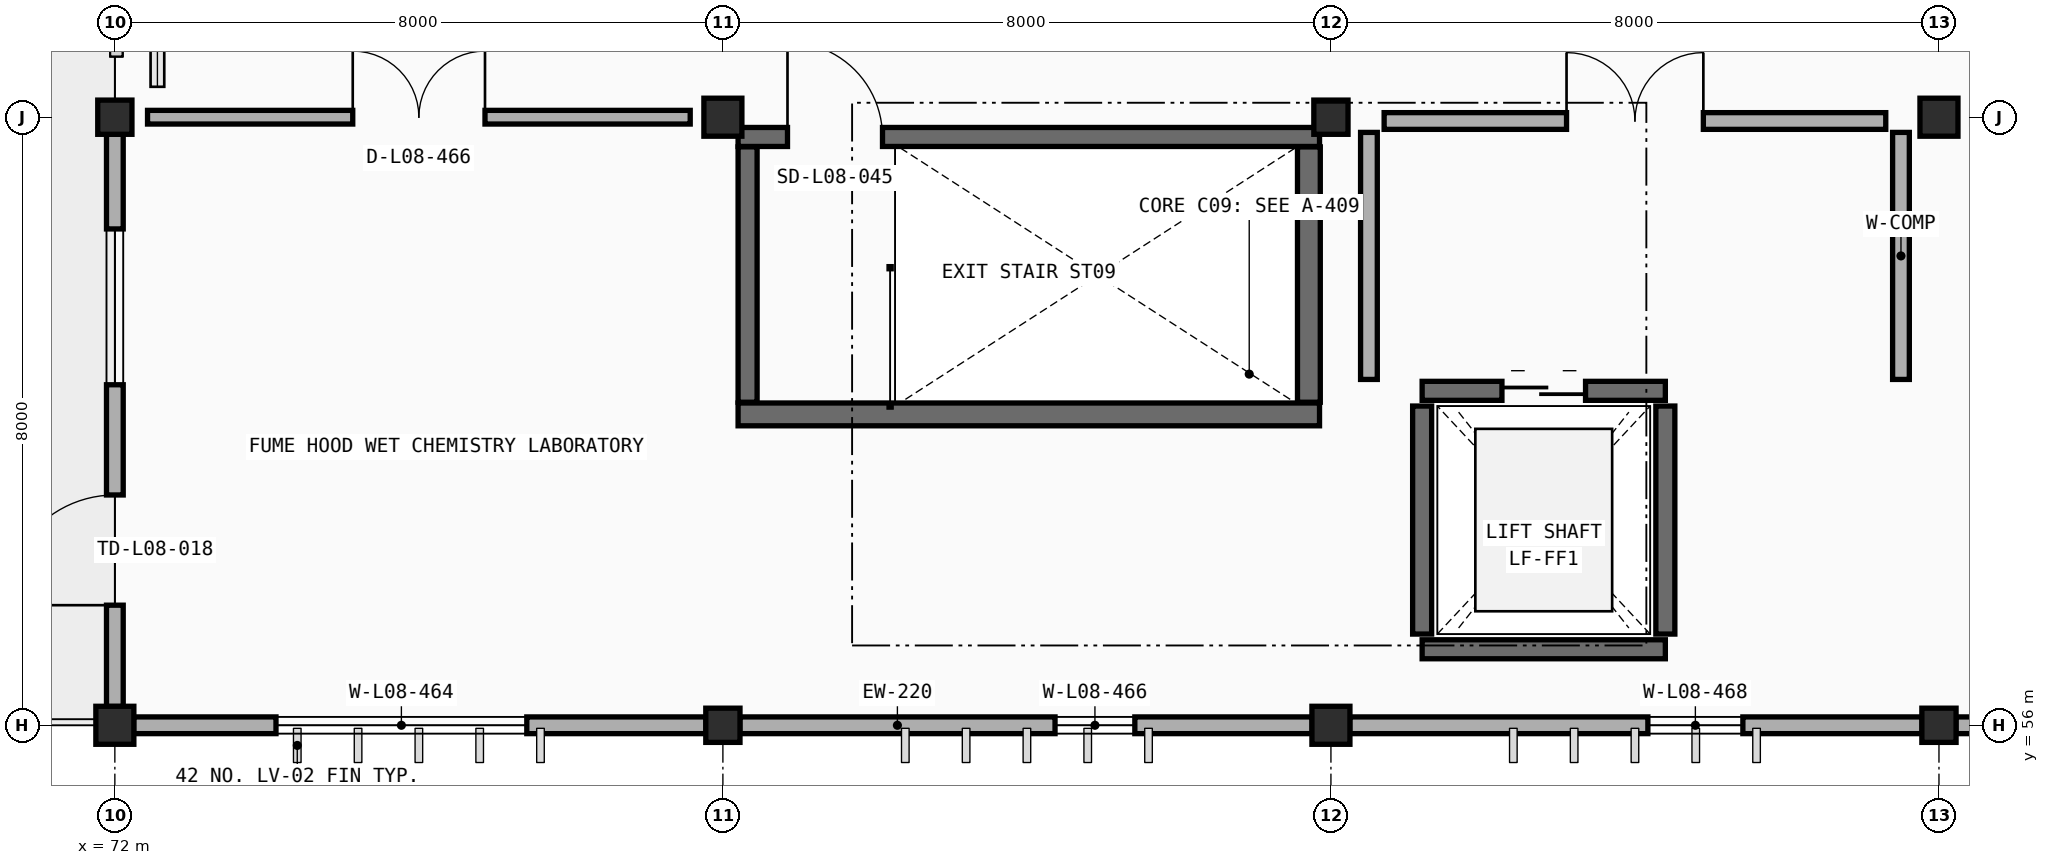
"""IFC4 building model, lengths in metres.
Left out: names, types, materials, properties, quantities, classifications, styles, units other than length and angle.
Written with IfcOpenShell. Run it as: python <this file> out.ifc"""

import sys

from ifc_helpers import new_model, si_unit, direction, frame, frame_2d, origin, origin_2d, place, context, subcontext, project, spatial, rectangle, extrude, element, fill, save


model = new_model("IFC4")
c1 = context("Model", 3, precision=1e-05, world=origin(), true_north=direction((0.0, 1.0)))
c2 = subcontext(c1, "Body", "Model", "MODEL_VIEW")
j1 = project(units=[si_unit("LENGTHUNIT", "METRE"), si_unit("PLANEANGLEUNIT", "RADIAN")], contexts=[c1])
p1 = place(None, origin())
s1 = spatial("IfcSite", under=j1, at=p1, CompositionType="ELEMENT")
p2 = place(p1, origin())
s2 = spatial("IfcBuilding", under=s1, at=p2, CompositionType="ELEMENT")
p3 = place(p2, frame((0.0, 0.0, 30.6)))
s3 = spatial("IfcBuildingStorey", under=s2, at=p3, CompositionType="ELEMENT", Elevation=30.6)
p4 = place(p3, frame((72.0, 56.0, 0.0), z_axis=(0.0, 0.0, 1.0), x_axis=(1.0, 0.0, 0.0)))
e1 = element("IfcColumn", 1, at=p4, inside=s3, PredefinedType="COLUMN", context=c2, shape_type="SweptSolid", body=[
    extrude(rectangle(XDim=0.5, YDim=0.5, at=origin_2d()), origin(), (0.0, 0.0, 1.0), 4.2),
])
p5 = place(p3, frame((80.0, 56.0, 0.0), z_axis=(0.0, 0.0, 1.0), x_axis=(1.0, 0.0, 0.0)))
e2 = element("IfcColumn", 2, at=p5, inside=s3, PredefinedType="COLUMN", context=c2, shape_type="SweptSolid", body=[
    extrude(rectangle(XDim=0.45, YDim=0.45, at=origin_2d()), origin(), (0.0, 0.0, 1.0), 4.2),
])
p6 = place(p3, frame((88.0, 56.0, 0.0), z_axis=(0.0, 0.0, 1.0), x_axis=(1.0, 0.0, 0.0)))
e3 = element("IfcColumn", 3, at=p6, inside=s3, PredefinedType="COLUMN", context=c2, shape_type="SweptSolid", body=[
    extrude(rectangle(XDim=0.5, YDim=0.5, at=origin_2d()), origin(), (0.0, 0.0, 1.0), 4.2),
])
for number, where, z_axis, x_axis in (
    (4, (96.0, 56.0, 0.0), (0.0, 0.0, 1.0), (1.0, 0.0, 0.0)),
    (5, (72.0, 64.0, 0.0), (0.0, 0.0, 1.0), (1.0, 0.0, 0.0)),
):
    element("IfcColumn", number, at=place(p3, frame(where, z_axis=z_axis, x_axis=x_axis)), inside=s3, PredefinedType="COLUMN", context=c2, shape_type="SweptSolid", body=[
        extrude(rectangle(XDim=0.45, YDim=0.45, at=origin_2d()), origin(), (0.0, 0.0, 1.0), 4.2),
    ])
p7 = place(p3, frame((80.0, 64.0, 0.0), z_axis=(0.0, 0.0, 1.0), x_axis=(1.0, 0.0, 0.0)))
e6 = element("IfcColumn", 6, at=p7, inside=s3, PredefinedType="COLUMN", context=c2, shape_type="SweptSolid", body=[
    extrude(rectangle(XDim=0.5, YDim=0.5, at=origin_2d()), origin(), (0.0, 0.0, 1.0), 4.2),
])
p8 = place(p3, frame((88.0, 64.0, 0.0), z_axis=(0.0, 0.0, 1.0), x_axis=(1.0, 0.0, 0.0)))
e7 = element("IfcColumn", 7, at=p8, inside=s3, PredefinedType="COLUMN", context=c2, shape_type="SweptSolid", body=[
    extrude(rectangle(XDim=0.45, YDim=0.45, at=origin_2d()), origin(), (0.0, 0.0, 1.0), 4.2),
])
p9 = place(p3, frame((96.0, 64.0, 0.0), z_axis=(0.0, 0.0, 1.0), x_axis=(1.0, 0.0, 0.0)))
e8 = element("IfcColumn", 8, at=p9, inside=s3, PredefinedType="COLUMN", context=c2, shape_type="SweptSolid", body=[
    extrude(rectangle(XDim=0.5, YDim=0.5, at=origin_2d()), origin(), (0.0, 0.0, 1.0), 4.2),
])
p10 = place(p3, frame((79.778, 56.0, 0.0), z_axis=(0.0, 0.0, 1.0), x_axis=(-1.0, 0.0, 0.0)))
e9 = element("IfcWall", 9, at=p10, inside=s3, PredefinedType="STANDARD", context=c2, shape_type="SweptSolid", body=[
    extrude(rectangle(XDim=7.531, YDim=0.22, at=frame_2d((3.766, 0.0))), origin(), (0.0, 0.0, 1.0), 3.335),
])
p11 = place(p10, frame((2.358, 0.0, 0.9)))
e10 = element("IfcOpeningElement", 10, at=p11, cuts=e9, PredefinedType="OPENING", context=c2, shape_type="SweptSolid", body=[
    extrude(rectangle(XDim=3.3, YDim=1.75, at=frame_2d((1.65, 0.875))), frame((0.0, 0.12, 0.0), z_axis=(0.0, -1.0, 0.0), x_axis=(1.0, 0.0, 0.0)), (0.0, 0.0, 1.0), 0.24),
])
p12 = place(p3, frame((87.753, 56.0, 0.0), z_axis=(0.0, 0.0, 1.0), x_axis=(-1.0, 0.0, 0.0)))
e11 = element("IfcWall", 11, at=p12, inside=s3, PredefinedType="STANDARD", context=c2, shape_type="SweptSolid", body=[
    extrude(rectangle(XDim=7.531, YDim=0.22, at=frame_2d((3.766, 0.0))), origin(), (0.0, 0.0, 1.0), 3.335),
])
p13 = place(p12, frame((2.333, 0.0, 0.9)))
e12 = element("IfcOpeningElement", 12, at=p13, cuts=e11, PredefinedType="OPENING", context=c2, shape_type="SweptSolid", body=[
    extrude(rectangle(XDim=1.05, YDim=1.25, at=frame_2d((0.525, 0.625))), frame((0.0, 0.12, 0.0), z_axis=(0.0, -1.0, 0.0), x_axis=(1.0, 0.0, 0.0)), (0.0, 0.0, 1.0), 0.24),
])
p14 = place(p3, frame((95.778, 56.0, 0.0), z_axis=(0.0, 0.0, 1.0), x_axis=(-1.0, 0.0, 0.0)))
e13 = element("IfcWall", 13, at=p14, inside=s3, PredefinedType="STANDARD", context=c2, shape_type="SweptSolid", body=[
    extrude(rectangle(XDim=7.531, YDim=0.22, at=frame_2d((3.766, 0.0))), origin(), (0.0, 0.0, 1.0), 3.335),
])
p15 = place(p14, frame((2.358, 0.0, 0.9)))
e14 = element("IfcOpeningElement", 14, at=p15, cuts=e13, PredefinedType="OPENING", context=c2, shape_type="SweptSolid", body=[
    extrude(rectangle(XDim=1.25, YDim=1.25, at=frame_2d((0.625, 0.625))), frame((0.0, 0.12, 0.0), z_axis=(0.0, -1.0, 0.0), x_axis=(1.0, 0.0, 0.0)), (0.0, 0.0, 1.0), 0.24),
])
p16 = place(p3, frame((103.753, 56.0, 0.0), z_axis=(0.0, 0.0, 1.0), x_axis=(-1.0, 0.0, 0.0)))
e15 = element("IfcWall", 15, at=p16, inside=s3, PredefinedType="STANDARD", context=c2, shape_type="SweptSolid", body=[
    extrude(rectangle(XDim=7.531, YDim=0.22, at=frame_2d((3.766, 0.0))), origin(), (0.0, 0.0, 1.0), 3.335),
])
p17 = place(p16, frame((2.333, 0.0, 0.9)))
e16 = element("IfcOpeningElement", 16, at=p17, cuts=e15, PredefinedType="OPENING", context=c2, shape_type="SweptSolid", body=[
    extrude(rectangle(XDim=3.3, YDim=1.75, at=frame_2d((1.65, 0.875))), frame((0.0, 0.12, 0.0), z_axis=(0.0, -1.0, 0.0), x_axis=(1.0, 0.0, 0.0)), (0.0, 0.0, 1.0), 0.24),
])
p18 = place(p3, frame((72.0, 56.247, 0.0), z_axis=(0.0, 0.0, 1.0), x_axis=(0.0, 1.0, 0.0)))
e17 = element("IfcWall", 17, at=p18, inside=s3, PredefinedType="STANDARD", context=c2, shape_type="SweptSolid", body=[
    extrude(rectangle(XDim=7.531, YDim=0.22, at=frame_2d((3.766, 0.0))), origin(), (0.0, 0.0, 1.0), 3.335),
])
p19 = place(p18, frame((1.333, 0.0, 0.0)))
e18 = element("IfcOpeningElement", 18, at=p19, cuts=e17, PredefinedType="OPENING", context=c2, shape_type="SweptSolid", body=[
    extrude(rectangle(XDim=1.45, YDim=2.25, at=frame_2d((0.725, 1.125))), frame((0.0, 0.12, 0.0), z_axis=(0.0, -1.0, 0.0), x_axis=(1.0, 0.0, 0.0)), (0.0, 0.0, 1.0), 0.24),
])
p20 = place(p18, frame((4.233, 0.0, 0.9)))
e19 = element("IfcOpeningElement", 19, at=p20, cuts=e17, PredefinedType="OPENING", context=c2, shape_type="SweptSolid", body=[
    extrude(rectangle(XDim=2.05, YDim=1.4, at=frame_2d((1.025, 0.7))), frame((0.0, 0.12, 0.0), z_axis=(0.0, -1.0, 0.0), x_axis=(1.0, 0.0, 0.0)), (0.0, 0.0, 1.0), 0.24),
])
p21 = place(p3, frame((72.24, 64.22, 0.0), z_axis=(0.0, 0.0, 1.0), x_axis=(1.0, 0.0, 0.0)))
e20 = element("IfcWall", 20, at=p21, inside=s3, PredefinedType="PARAPET", context=c2, shape_type="SweptSolid", body=[
    extrude(rectangle(XDim=0.32, YDim=0.2, at=frame_2d((0.16, 0.0))), origin(), (0.0, 0.0, 1.0), 3.35),
])
p22 = place(p3, frame((80.2, 60.09, 0.0), z_axis=(0.0, 0.0, 1.0), x_axis=(1.0, 0.0, 0.0)))
e21 = element("IfcWall", 21, at=p22, inside=s3, PredefinedType="SHEAR", context=c2, shape_type="SweptSolid", body=[
    extrude(rectangle(XDim=7.65, YDim=0.3, at=frame_2d((3.825, 0.0))), origin(), (0.0, 0.0, 1.0), 4.2),
])
p23 = place(p3, frame((87.71, 60.25, 0.0), z_axis=(0.0, 0.0, 1.0), x_axis=(0.0, 1.0, 0.0)))
e22 = element("IfcWall", 22, at=p23, inside=s3, PredefinedType="SHEAR", context=c2, shape_type="SweptSolid", body=[
    extrude(rectangle(XDim=3.36, YDim=0.3, at=frame_2d((1.68, 0.0))), origin(), (0.0, 0.0, 1.0), 4.2),
])
p24 = place(p3, frame((80.2, 63.74, 0.0), z_axis=(0.0, 0.0, 1.0), x_axis=(1.0, 0.0, 0.0)))
e23 = element("IfcWall", 23, at=p24, inside=s3, PredefinedType="SOLIDWALL", context=c2, shape_type="SweptSolid", body=[
    extrude(rectangle(XDim=7.65, YDim=0.25, at=frame_2d((3.825, 0.0))), origin(), (0.0, 0.0, 1.0), 4.2),
])
p25 = place(p24, frame((0.65, 0.0, 0.0)))
e24 = element("IfcOpeningElement", 24, at=p25, cuts=e23, PredefinedType="OPENING", context=c2, shape_type="SweptSolid", body=[
    extrude(rectangle(XDim=1.25, YDim=2.15, at=frame_2d((0.625, 1.075))), frame((0.0, 0.135, 0.0), z_axis=(0.0, -1.0, 0.0), x_axis=(1.0, 0.0, 0.0)), (0.0, 0.0, 1.0), 0.27),
])
p26 = place(p3, frame((80.325, 60.25, 0.0), z_axis=(0.0, 0.0, 1.0), x_axis=(0.0, 1.0, 0.0)))
e25 = element("IfcWall", 25, at=p26, inside=s3, PredefinedType="SOLIDWALL", context=c2, shape_type="SweptSolid", body=[
    extrude(rectangle(XDim=3.36, YDim=0.25, at=frame_2d((1.68, 0.0))), origin(), (0.0, 0.0, 1.0), 4.2),
])
p27 = place(p3, frame((89.2, 57.0, 0.0), z_axis=(0.0, 0.0, 1.0), x_axis=(1.0, 0.0, 0.0)))
e26 = element("IfcWall", 26, at=p27, inside=s3, PredefinedType="SOLIDWALL", context=c2, shape_type="SweptSolid", body=[
    extrude(rectangle(XDim=3.2, YDim=0.25, at=frame_2d((1.6, 0.0))), origin(), (0.0, 0.0, 1.0), 4.2),
])
p28 = place(p3, frame((89.2, 60.4, 0.0), z_axis=(0.0, 0.0, 1.0), x_axis=(1.0, 0.0, 0.0)))
e27 = element("IfcWall", 27, at=p28, inside=s3, PredefinedType="SOLIDWALL", context=c2, shape_type="SweptSolid", body=[
    extrude(rectangle(XDim=3.2, YDim=0.25, at=frame_2d((1.6, 0.0))), origin(), (0.0, 0.0, 1.0), 4.2),
])
p29 = place(p28, frame((1.05, 0.0, 0.0)))
e28 = element("IfcOpeningElement", 28, at=p29, cuts=e27, PredefinedType="OPENING", context=c2, shape_type="SweptSolid", body=[
    extrude(rectangle(XDim=1.1, YDim=2.15, at=frame_2d((0.55, 1.075))), frame((0.0, 0.135, 0.0), z_axis=(0.0, -1.0, 0.0), x_axis=(1.0, 0.0, 0.0)), (0.0, 0.0, 1.0), 0.27),
])
for number, where, z_axis, x_axis in (
    (29, (89.2, 57.2, 0.0), (0.0, 0.0, 1.0), (0.0, 1.0, 0.0)),
    (30, (92.4, 57.2, 0.0), (0.0, 0.0, 1.0), (0.0, 1.0, 0.0)),
):
    element("IfcWall", number, at=place(p3, frame(where, z_axis=z_axis, x_axis=x_axis)), inside=s3, PredefinedType="SOLIDWALL", context=c2, shape_type="SweptSolid", body=[
        extrude(rectangle(XDim=3.0, YDim=0.25, at=frame_2d((1.5, 0.0))), origin(), (0.0, 0.0, 1.0), 4.2),
    ])
p30 = place(p3, frame((88.7, 63.95, 0.0), z_axis=(0.0, 0.0, 1.0), x_axis=(1.0, 0.0, 0.0)))
e31 = element("IfcWall", 31, at=p30, inside=s3, PredefinedType="PARTITIONING", context=c2, shape_type="SweptSolid", body=[
    extrude(rectangle(XDim=6.6, YDim=0.22, at=frame_2d((3.3, 0.0))), origin(), (0.0, 0.0, 1.0), 3.3),
])
p31 = place(p30, frame((2.4, 0.0, 0.0)))
e32 = element("IfcOpeningElement", 32, at=p31, cuts=e31, PredefinedType="OPENING", context=c2, shape_type="SweptSolid", body=[
    extrude(rectangle(XDim=1.8, YDim=2.2, at=frame_2d((0.9, 1.1))), frame((0.0, 0.12, 0.0), z_axis=(0.0, -1.0, 0.0), x_axis=(1.0, 0.0, 0.0)), (0.0, 0.0, 1.0), 0.24),
])
for number, where, z_axis, x_axis in (
    (33, (88.5, 60.55, 0.0), (0.0, 0.0, 1.0), (0.0, 1.0, 0.0)),
    (34, (95.5, 60.55, 0.0), (0.0, 0.0, 1.0), (0.0, 1.0, 0.0)),
):
    element("IfcWall", number, at=place(p3, frame(where, z_axis=z_axis, x_axis=x_axis)), inside=s3, PredefinedType="PARTITIONING", context=c2, shape_type="SweptSolid", body=[
        extrude(rectangle(XDim=3.25, YDim=0.22, at=frame_2d((1.625, 0.0))), origin(), (0.0, 0.0, 1.0), 3.3),
    ])
p32 = place(p3, frame((72.43, 64.0, 0.0), z_axis=(0.0, 0.0, 1.0), x_axis=(1.0, 0.0, 0.0)))
e35 = element("IfcWall", 35, at=p32, inside=s3, PredefinedType="PARTITIONING", context=c2, shape_type="SweptSolid", body=[
    extrude(rectangle(XDim=7.14, YDim=0.18, at=frame_2d((3.57, 0.0))), origin(), (0.0, 0.0, 1.0), 3.3),
])
p33 = place(p32, frame((2.7, 0.0, 0.0)))
e36 = element("IfcOpeningElement", 36, at=p33, cuts=e35, PredefinedType="OPENING", context=c2, shape_type="SweptSolid", body=[
    extrude(rectangle(XDim=1.74, YDim=2.22, at=frame_2d((0.87, 1.11))), frame((0.0, 0.1, 0.0), z_axis=(0.0, -1.0, 0.0), x_axis=(1.0, 0.0, 0.0)), (0.0, 0.0, 1.0), 0.2),
])
p34 = place(p11, origin())
e37 = element("IfcWindow", 37, at=p34, inside=s3, PartitioningType="DOUBLE_PANEL_VERTICAL", PredefinedType="WINDOW", context=c2, shape_type="SweptSolid", body=[
    extrude(rectangle(XDim=3.3, YDim=1.75, at=frame_2d((1.65, 0.875))), frame((0.0, 0.03, 0.0), z_axis=(0.0, -1.0, 0.0), x_axis=(1.0, 0.0, 0.0)), (0.0, 0.0, 1.0), 0.06),
])
fill(e10, e37)
p35 = place(p13, origin())
e38 = element("IfcWindow", 38, at=p35, inside=s3, PartitioningType="SINGLE_PANEL", PredefinedType="WINDOW", context=c2, shape_type="SweptSolid", body=[
    extrude(rectangle(XDim=1.05, YDim=1.25, at=frame_2d((0.525, 0.625))), frame((0.0, 0.03, 0.0), z_axis=(0.0, -1.0, 0.0), x_axis=(1.0, 0.0, 0.0)), (0.0, 0.0, 1.0), 0.06),
])
fill(e12, e38)
p36 = place(p15, origin())
e39 = element("IfcWindow", 39, at=p36, inside=s3, PartitioningType="SINGLE_PANEL", PredefinedType="WINDOW", context=c2, shape_type="SweptSolid", body=[
    extrude(rectangle(XDim=1.25, YDim=1.25, at=frame_2d((0.625, 0.625))), frame((0.0, 0.03, 0.0), z_axis=(0.0, -1.0, 0.0), x_axis=(1.0, 0.0, 0.0)), (0.0, 0.0, 1.0), 0.06),
])
fill(e14, e39)
p37 = place(p19, origin())
e40 = element("IfcDoor", 40, at=p37, inside=s3, OperationType="SINGLE_SWING_LEFT", PredefinedType="DOOR", context=c2, shape_type="SweptSolid", body=[
    extrude(rectangle(XDim=1.45, YDim=2.25, at=frame_2d((0.725, 1.125))), frame((0.0, 0.025, 0.0), z_axis=(0.0, -1.0, 0.0), x_axis=(1.0, 0.0, 0.0)), (0.0, 0.0, 1.0), 0.05),
])
fill(e18, e40)
p38 = place(p20, origin())
e41 = element("IfcWindow", 41, at=p38, inside=s3, PartitioningType="DOUBLE_PANEL_VERTICAL", PredefinedType="WINDOW", context=c2, shape_type="SweptSolid", body=[
    extrude(rectangle(XDim=2.05, YDim=1.4, at=frame_2d((1.025, 0.7))), frame((0.0, 0.03, 0.0), z_axis=(0.0, -1.0, 0.0), x_axis=(1.0, 0.0, 0.0)), (0.0, 0.0, 1.0), 0.06),
])
fill(e19, e41)
p39 = place(p25, origin())
e42 = element("IfcDoor", 42, at=p39, inside=s3, OperationType="SINGLE_SWING_LEFT", PredefinedType="DOOR", context=c2, shape_type="SweptSolid", body=[
    extrude(rectangle(XDim=1.25, YDim=2.15, at=frame_2d((0.625, 1.075))), frame((0.0, 0.025, 0.0), z_axis=(0.0, -1.0, 0.0), x_axis=(1.0, 0.0, 0.0)), (0.0, 0.0, 1.0), 0.05),
])
fill(e24, e42)
p40 = place(p29, origin())
e43 = element("IfcDoor", 43, at=p40, inside=s3, OperationType="DOUBLE_DOOR_SLIDING", PredefinedType="DOOR", context=c2, shape_type="SweptSolid", body=[
    extrude(rectangle(XDim=1.1, YDim=2.15, at=frame_2d((0.55, 1.075))), frame((0.0, 0.025, 0.0), z_axis=(0.0, -1.0, 0.0), x_axis=(1.0, 0.0, 0.0)), (0.0, 0.0, 1.0), 0.05),
])
fill(e28, e43)
p41 = place(p31, origin())
e44 = element("IfcDoor", 44, at=p41, inside=s3, OperationType="DOUBLE_DOOR_SINGLE_SWING", PredefinedType="DOOR", context=c2, shape_type="SweptSolid", body=[
    extrude(rectangle(XDim=1.8, YDim=2.2, at=frame_2d((0.9, 1.1))), frame((0.0, 0.025, 0.0), z_axis=(0.0, -1.0, 0.0), x_axis=(1.0, 0.0, 0.0)), (0.0, 0.0, 1.0), 0.05),
])
fill(e32, e44)
p42 = place(p33, origin())
e45 = element("IfcDoor", 45, at=p42, inside=s3, OperationType="DOUBLE_DOOR_SINGLE_SWING", PredefinedType="DOOR", context=c2, shape_type="SweptSolid", body=[
    extrude(rectangle(XDim=1.74, YDim=2.22, at=frame_2d((0.87, 1.11))), frame((0.0, 0.025, 0.0), z_axis=(0.0, -1.0, 0.0), x_axis=(1.0, 0.0, 0.0)), (0.0, 0.0, 1.0), 0.05),
])
fill(e36, e45)
save(model, sys.argv[1])
